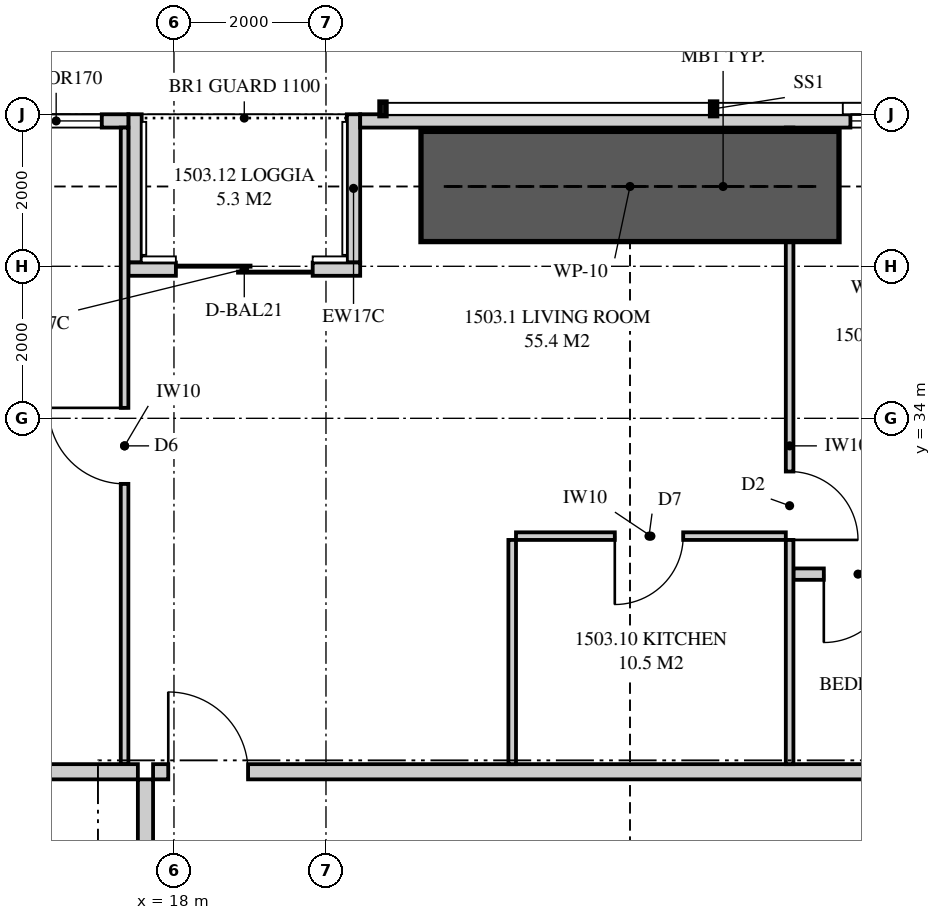
"""IFC4 building model, lengths in metres.
Left out: names, types, materials, properties, quantities, classifications, styles, units other than length and angle.
Written with IfcOpenShell. Run it as: python <this file> out.ifc"""

import sys

from ifc_helpers import new_model, si_unit, direction, frame, frame_2d, origin, place, context, subcontext, project, spatial, polyline, rectangle, outline, extrude, element, fill, save


model = new_model("IFC4")
c1 = context("Model", 3, precision=1e-05, world=origin(), true_north=direction((0.0, 1.0)))
c2 = subcontext(c1, "Body", "Model", "MODEL_VIEW")
j1 = project(units=[si_unit("LENGTHUNIT", "METRE"), si_unit("PLANEANGLEUNIT", "RADIAN")], contexts=[c1])
p1 = place(None, origin())
s1 = spatial("IfcSite", under=j1, at=p1, CompositionType="ELEMENT")
p2 = place(p1, origin())
s2 = spatial("IfcBuilding", under=s1, at=p2, CompositionType="ELEMENT")
p3 = place(p2, frame((0.0, 0.0, 57.85)))
s3 = spatial("IfcBuildingStorey", under=s2, at=p3, CompositionType="ELEMENT", Elevation=57.85)
p4 = place(p3, frame((37.824, 37.913, 0.0), z_axis=(0.0, 0.0, 1.0), x_axis=(-1.0, 0.0, 0.0)))
e1 = element("IfcWall", 1, at=p4, inside=s3, PredefinedType="SOLIDWALL", context=c2, shape_type="SweptSolid", body=[
    extrude(outline(polyline([(0.0, 0.0), (17.374, 0.0), (17.374, 2.15), (2.824, 2.15), (2.824, 3.11), (2.668, 3.11), (2.668, 2.15), (2.62, 2.15), (2.62, 3.11), (0.0, 3.11), (0.0, 0.0)])), frame((0.0, 0.087, 0.0), z_axis=(0.0, -1.0, 0.0), x_axis=(1.0, 0.0, 0.0)), (0.0, 0.0, 1.0), 0.175),
])
p5 = place(p4, frame((5.699, 0.0, 0.4)))
e2 = element("IfcOpeningElement", 2, at=p5, cuts=e1, PredefinedType="OPENING", context=c2, shape_type="SweptSolid", body=[
    extrude(rectangle(XDim=1.8, YDim=1.7, at=frame_2d((0.9, 0.85))), frame((0.0, 0.097, 0.0), z_axis=(0.0, -1.0, 0.0), x_axis=(1.0, 0.0, 0.0)), (0.0, 0.0, 1.0), 0.195),
])
p6 = place(p4, frame((9.124, 0.0, 0.4)))
e3 = element("IfcOpeningElement", 3, at=p6, cuts=e1, PredefinedType="OPENING", context=c2, shape_type="SweptSolid", body=[
    extrude(rectangle(XDim=1.8, YDim=1.7, at=frame_2d((0.9, 0.85))), frame((0.0, 0.097, 0.0), z_axis=(0.0, -1.0, 0.0), x_axis=(1.0, 0.0, 0.0)), (0.0, 0.0, 1.0), 0.195),
])
p7 = place(p3, frame((17.4, 37.913, 0.0), z_axis=(0.0, 0.0, 1.0), x_axis=(-1.0, 0.0, 0.0)))
e4 = element("IfcWall", 4, at=p7, inside=s3, PredefinedType="SOLIDWALL", context=c2, shape_type="SweptSolid", body=[
    extrude(outline(polyline([(0.0, 0.0), (12.349, 0.0), (12.349, 3.11), (4.604, 3.11), (4.604, 2.15), (4.556, 2.15), (4.556, 3.11), (4.4, 3.11), (4.4, 2.15), (0.0, 2.15), (0.0, 0.0)])), frame((0.0, 0.087, 0.0), z_axis=(0.0, -1.0, 0.0), x_axis=(1.0, 0.0, 0.0)), (0.0, 0.0, 1.0), 0.175),
])
p8 = place(p7, frame((0.35, 0.0, 0.4)))
e5 = element("IfcOpeningElement", 5, at=p8, cuts=e4, PredefinedType="OPENING", context=c2, shape_type="SweptSolid", body=[
    extrude(rectangle(XDim=1.2, YDim=1.7, at=frame_2d((0.6, 0.85))), frame((0.0, 0.097, 0.0), z_axis=(0.0, -1.0, 0.0), x_axis=(1.0, 0.0, 0.0)), (0.0, 0.0, 1.0), 0.195),
])
p9 = place(p7, frame((8.3, 0.0, 0.4)))
e6 = element("IfcOpeningElement", 6, at=p9, cuts=e4, PredefinedType="OPENING", context=c2, shape_type="SweptSolid", body=[
    extrude(rectangle(XDim=1.8, YDim=1.7, at=frame_2d((0.9, 0.85))), frame((0.0, 0.097, 0.0), z_axis=(0.0, -1.0, 0.0), x_axis=(1.0, 0.0, 0.0)), (0.0, 0.0, 1.0), 0.195),
])
p10 = place(p3, frame((20.45, 35.962, 0.0), z_axis=(0.0, 0.0, 1.0), x_axis=(-1.0, 0.0, 0.0)))
e7 = element("IfcWall", 7, at=p10, inside=s3, PredefinedType="SOLIDWALL", context=c2, shape_type="SweptSolid", body=[
    extrude(rectangle(XDim=3.05, YDim=0.175, at=frame_2d((1.525, 0.0))), origin(), (0.0, 0.0, 1.0), 3.11),
])
p11 = place(p10, frame((0.625, 0.0, 0.0)))
e8 = element("IfcOpeningElement", 8, at=p11, cuts=e7, PredefinedType="OPENING", context=c2, shape_type="SweptSolid", body=[
    extrude(rectangle(XDim=1.8, YDim=2.1, at=frame_2d((0.9, 1.05))), frame((0.0, 0.097, 0.0), z_axis=(0.0, -1.0, 0.0), x_axis=(1.0, 0.0, 0.0)), (0.0, 0.0, 1.0), 0.195),
])
for number, where, z_axis, x_axis in (
    (9, (20.363, 38.0, 0.0), (0.0, 0.0, 1.0), (0.0, -1.0, 0.0)),
    (10, (17.488, 38.0, 0.0), (0.0, 0.0, 1.0), (0.0, -1.0, 0.0)),
):
    element("IfcWall", number, at=place(p3, frame(where, z_axis=z_axis, x_axis=x_axis)), inside=s3, PredefinedType="SOLIDWALL", context=c2, shape_type="SweptSolid", body=[
        extrude(outline(polyline([(0.0, 0.0), (1.95, 0.0), (1.95, 3.11), (1.75, 3.11), (1.75, 2.15), (0.15, 2.15), (0.15, 3.11), (0.0, 3.11), (0.0, 0.0)])), frame((0.0, 0.087, 0.0), z_axis=(0.0, -1.0, 0.0), x_axis=(1.0, 0.0, 0.0)), (0.0, 0.0, 1.0), 0.175),
    ])
p12 = place(p3, frame((17.725, 29.35, 0.0), z_axis=(0.0, 0.0, 1.0), x_axis=(1.0, 0.0, 0.0)))
e11 = element("IfcWall", 11, at=p12, inside=s3, PredefinedType="PARTITIONING", context=c2, shape_type="SweptSolid", body=[
    extrude(outline(polyline([(0.0, 0.0), (15.275, 0.0), (15.275, 3.11), (6.612, 3.11), (6.612, 2.541), (5.938, 2.541), (5.938, 3.11), (0.0, 3.11), (0.0, 0.0)])), frame((0.0, 0.1, 0.0), z_axis=(0.0, -1.0, 0.0), x_axis=(1.0, 0.0, 0.0)), (0.0, 0.0, 1.0), 0.2),
])
p13 = place(p12, frame((0.2, 0.0, 0.0)))
e12 = element("IfcOpeningElement", 12, at=p13, cuts=e11, PredefinedType="OPENING", context=c2, shape_type="SweptSolid", body=[
    extrude(rectangle(XDim=1.05, YDim=2.2, at=frame_2d((0.525, 1.1))), frame((0.0, 0.11, 0.0), z_axis=(0.0, -1.0, 0.0), x_axis=(1.0, 0.0, 0.0)), (0.0, 0.0, 1.0), 0.22),
])
p14 = place(p3, frame((26.1, 37.825, 0.0), z_axis=(0.0, 0.0, 1.0), x_axis=(0.0, -1.0, 0.0)))
e13 = element("IfcWall", 13, at=p14, inside=s3, PredefinedType="PARTITIONING", context=c2, shape_type="SweptSolid", body=[
    extrude(outline(polyline([(0.529, 2.15), (0.0, 2.15), (0.0, 0.0), (0.529, 0.0), (0.529, 0.034), (1.021, 0.034), (1.021, 0.0), (8.375, 0.0), (8.375, 3.11), (1.635, 3.11), (1.635, 2.15), (1.021, 2.15), (1.021, 2.116), (0.529, 2.116), (0.529, 2.15)])), frame((0.0, 0.05, 0.0), z_axis=(0.0, -1.0, 0.0), x_axis=(1.0, 0.0, 0.0)), (0.0, 0.0, 1.0), 0.1),
])
p15 = place(p14, frame((4.525, 0.0, 0.0)))
e14 = element("IfcOpeningElement", 14, at=p15, cuts=e13, PredefinedType="OPENING", context=c2, shape_type="SweptSolid", body=[
    extrude(rectangle(XDim=0.9, YDim=2.1, at=frame_2d((0.45, 1.05))), frame((0.0, 0.06, 0.0), z_axis=(0.0, -1.0, 0.0), x_axis=(1.0, 0.0, 0.0)), (0.0, 0.0, 1.0), 0.12),
])
p16 = place(p3, frame((26.15, 31.95, 0.0), z_axis=(0.0, 0.0, 1.0), x_axis=(1.0, 0.0, 0.0)))
e15 = element("IfcWall", 15, at=p16, inside=s3, PredefinedType="PLUMBINGWALL", context=c2, shape_type="SweptSolid", body=[
    extrude(rectangle(XDim=3.3, YDim=0.15, at=frame_2d((1.65, 0.0))), origin(), (0.0, 0.0, 1.0), 3.11),
])
p17 = place(p16, frame((0.4, 0.0, 0.0)))
e16 = element("IfcOpeningElement", 16, at=p17, cuts=e15, PredefinedType="OPENING", context=c2, shape_type="SweptSolid", body=[
    extrude(rectangle(XDim=0.9, YDim=2.1, at=frame_2d((0.45, 1.05))), frame((0.0, 0.085, 0.0), z_axis=(0.0, -1.0, 0.0), x_axis=(1.0, 0.0, 0.0)), (0.0, 0.0, 1.0), 0.17),
])
p18 = place(p3, frame((22.5, 32.45, 0.0), z_axis=(0.0, 0.0, 1.0), x_axis=(1.0, 0.0, 0.0)))
e17 = element("IfcWall", 17, at=p18, inside=s3, PredefinedType="PARTITIONING", context=c2, shape_type="SweptSolid", body=[
    extrude(outline(polyline([(0.0, 0.0), (3.55, 0.0), (3.55, 3.11), (1.787, 3.11), (1.787, 2.541), (1.213, 2.541), (1.213, 3.11), (0.0, 3.11), (0.0, 0.0)])), frame((0.0, 0.05, 0.0), z_axis=(0.0, -1.0, 0.0), x_axis=(1.0, 0.0, 0.0)), (0.0, 0.0, 1.0), 0.1),
])
p19 = place(p18, frame((1.3, 0.0, 0.0)))
e18 = element("IfcOpeningElement", 18, at=p19, cuts=e17, PredefinedType="OPENING", context=c2, shape_type="SweptSolid", body=[
    extrude(rectangle(XDim=0.9, YDim=2.1, at=frame_2d((0.45, 1.05))), frame((0.0, 0.06, 0.0), z_axis=(0.0, -1.0, 0.0), x_axis=(1.0, 0.0, 0.0)), (0.0, 0.0, 1.0), 0.12),
])
p20 = place(p3, frame((22.45, 32.4, 0.0), z_axis=(0.0, 0.0, 1.0), x_axis=(0.0, -1.0, 0.0)))
e19 = element("IfcWall", 19, at=p20, inside=s3, PredefinedType="PARTITIONING", context=c2, shape_type="SweptSolid", body=[
    extrude(rectangle(XDim=2.95, YDim=0.1, at=frame_2d((1.475, 0.0))), origin(), (0.0, 0.0, 1.0), 3.11),
])
p21 = place(p3, frame((17.35, 37.825, 0.0), z_axis=(0.0, 0.0, 1.0), x_axis=(0.0, -1.0, 0.0)))
e20 = element("IfcWall", 20, at=p21, inside=s3, PredefinedType="PARTITIONING", context=c2, shape_type="SweptSolid", body=[
    extrude(outline(polyline([(0.0, 0.0), (8.375, 0.0), (8.375, 3.11), (1.635, 3.11), (1.635, 2.15), (0.0, 2.15), (0.0, 3.11), (0.0, 0.0)])), frame((0.0, 0.05, 0.0), z_axis=(0.0, -1.0, 0.0), x_axis=(1.0, 0.0, 0.0)), (0.0, 0.0, 1.0), 0.1),
])
p22 = place(p21, frame((3.688, 0.0, 0.0)))
e21 = element("IfcOpeningElement", 21, at=p22, cuts=e20, PredefinedType="OPENING", context=c2, shape_type="SweptSolid", body=[
    extrude(rectangle(XDim=1.0, YDim=2.1, at=frame_2d((0.5, 1.05))), frame((0.0, 0.06, 0.0), z_axis=(0.0, -1.0, 0.0), x_axis=(1.0, 0.0, 0.0)), (0.0, 0.0, 1.0), 0.12),
])
p23 = place(p3, frame((2.0, 29.35, 0.0), z_axis=(0.0, 0.0, 1.0), x_axis=(1.0, 0.0, 0.0)))
e22 = element("IfcWall", 22, at=p23, inside=s3, PredefinedType="PARTITIONING", context=c2, shape_type="SweptSolid", body=[
    extrude(outline(polyline([(0.0, 0.0), (15.525, 0.0), (15.525, 3.11), (11.337, 3.11), (11.337, 2.541), (10.663, 2.541), (10.663, 3.11), (9.51, 3.11), (9.51, 2.51), (6.89, 2.51), (6.89, 3.11), (2.969, 3.11), (2.969, 2.541), (2.577, 2.541), (2.577, 2.15), (0.733, 2.15), (0.733, 3.11), (0.0, 3.11), (0.0, 0.0)])), frame((0.0, 0.1, 0.0), z_axis=(0.0, -1.0, 0.0), x_axis=(1.0, 0.0, 0.0)), (0.0, 0.0, 1.0), 0.2),
])
p24 = place(p3, frame((17.625, 24.2, 0.0), z_axis=(0.0, 0.0, 1.0), x_axis=(0.0, 1.0, 0.0)))
e23 = element("IfcWall", 23, at=p24, inside=s3, PredefinedType="PARTITIONING", context=c2, shape_type="SweptSolid", body=[
    extrude(outline(polyline([(0.0, 0.0), (5.05, 0.0), (5.05, 3.11), (1.137, 3.11), (1.137, 2.541), (0.463, 2.541), (0.463, 3.11), (0.0, 3.11), (0.0, 0.0)])), frame((0.0, 0.1, 0.0), z_axis=(0.0, -1.0, 0.0), x_axis=(1.0, 0.0, 0.0)), (0.0, 0.0, 1.0), 0.2),
])
p25 = place(p24, frame((1.075, 0.0, 0.0)))
e24 = element("IfcOpeningElement", 24, at=p25, cuts=e23, PredefinedType="OPENING", context=c2, shape_type="SweptSolid", body=[
    extrude(rectangle(XDim=1.8, YDim=2.1, at=frame_2d((0.9, 1.05))), frame((0.0, 0.11, 0.0), z_axis=(0.0, -1.0, 0.0), x_axis=(1.0, 0.0, 0.0)), (0.0, 0.0, 1.0), 0.22),
])
p26 = place(p3, frame((21.25, 37.05, 0.0), z_axis=(0.0, 0.0, 1.0), x_axis=(1.0, 0.0, 0.0)))
e25 = element("IfcWall", 25, at=p26, inside=s3, PredefinedType="SHEAR", context=c2, shape_type="SweptSolid", body=[
    extrude(rectangle(XDim=5.5, YDim=1.45, at=frame_2d((2.75, 0.0))), origin(), (0.0, 0.0, 1.0), 3.35),
])
p27 = place(p6, origin())
e26 = element("IfcWindow", 26, at=p27, inside=s3, PartitioningType="SINGLE_PANEL", PredefinedType="WINDOW", context=c2, shape_type="SweptSolid", body=[
    extrude(rectangle(XDim=1.8, YDim=1.7, at=frame_2d((0.9, 0.85))), frame((0.0, 0.03, 0.0), z_axis=(0.0, -1.0, 0.0), x_axis=(1.0, 0.0, 0.0)), (0.0, 0.0, 1.0), 0.06),
])
fill(e3, e26)
p28 = place(p11, origin())
e27 = element("IfcDoor", 27, at=p28, inside=s3, OperationType="SLIDING_TO_LEFT", PredefinedType="DOOR", context=c2, shape_type="SweptSolid", body=[
    extrude(rectangle(XDim=1.8, YDim=2.1, at=frame_2d((0.9, 1.05))), frame((0.0, 0.025, 0.0), z_axis=(0.0, -1.0, 0.0), x_axis=(1.0, 0.0, 0.0)), (0.0, 0.0, 1.0), 0.05),
])
fill(e8, e27)
p29 = place(p8, origin())
e28 = element("IfcWindow", 28, at=p29, inside=s3, PartitioningType="SINGLE_PANEL", PredefinedType="WINDOW", context=c2, shape_type="SweptSolid", body=[
    extrude(rectangle(XDim=1.2, YDim=1.7, at=frame_2d((0.6, 0.85))), frame((0.0, 0.03, 0.0), z_axis=(0.0, -1.0, 0.0), x_axis=(1.0, 0.0, 0.0)), (0.0, 0.0, 1.0), 0.06),
])
fill(e5, e28)
p30 = place(p13, origin())
e29 = element("IfcDoor", 29, at=p30, inside=s3, OperationType="SINGLE_SWING_LEFT", PredefinedType="DOOR", context=c2, shape_type="SweptSolid", body=[
    extrude(rectangle(XDim=1.05, YDim=2.2, at=frame_2d((0.525, 1.1))), frame((0.0, 0.025, 0.0), z_axis=(0.0, -1.0, 0.0), x_axis=(1.0, 0.0, 0.0)), (0.0, 0.0, 1.0), 0.05),
])
fill(e12, e29)
p31 = place(p15, origin())
e30 = element("IfcDoor", 30, at=p31, inside=s3, OperationType="SINGLE_SWING_RIGHT", PredefinedType="DOOR", context=c2, shape_type="SweptSolid", body=[
    extrude(rectangle(XDim=0.9, YDim=2.1, at=frame_2d((0.45, 1.05))), frame((0.0, 0.025, 0.0), z_axis=(0.0, -1.0, 0.0), x_axis=(1.0, 0.0, 0.0)), (0.0, 0.0, 1.0), 0.05),
])
fill(e14, e30)
p32 = place(p17, frame((0.9, 0.0, 0.0), z_axis=(0.0, 0.0, 1.0), x_axis=(-1.0, 0.0, 0.0)))
e31 = element("IfcDoor", 31, at=p32, inside=s3, OperationType="SINGLE_SWING_RIGHT", PredefinedType="DOOR", context=c2, shape_type="SweptSolid", body=[
    extrude(rectangle(XDim=0.9, YDim=2.1, at=frame_2d((0.45, 1.05))), frame((0.0, 0.025, 0.0), z_axis=(0.0, -1.0, 0.0), x_axis=(1.0, 0.0, 0.0)), (0.0, 0.0, 1.0), 0.05),
])
fill(e16, e31)
p33 = place(p19, frame((0.9, 0.0, 0.0), z_axis=(0.0, 0.0, 1.0), x_axis=(-1.0, 0.0, 0.0)))
e32 = element("IfcDoor", 32, at=p33, inside=s3, OperationType="SINGLE_SWING_RIGHT", PredefinedType="DOOR", context=c2, shape_type="SweptSolid", body=[
    extrude(rectangle(XDim=0.9, YDim=2.1, at=frame_2d((0.45, 1.05))), frame((0.0, 0.025, 0.0), z_axis=(0.0, -1.0, 0.0), x_axis=(1.0, 0.0, 0.0)), (0.0, 0.0, 1.0), 0.05),
])
fill(e18, e32)
p34 = place(p22, frame((1.0, 0.0, 0.0), z_axis=(0.0, 0.0, 1.0), x_axis=(-1.0, 0.0, 0.0)))
e33 = element("IfcDoor", 33, at=p34, inside=s3, OperationType="SINGLE_SWING_RIGHT", PredefinedType="DOOR", context=c2, shape_type="SweptSolid", body=[
    extrude(rectangle(XDim=1.0, YDim=2.1, at=frame_2d((0.5, 1.05))), frame((0.0, 0.025, 0.0), z_axis=(0.0, -1.0, 0.0), x_axis=(1.0, 0.0, 0.0)), (0.0, 0.0, 1.0), 0.05),
])
fill(e21, e33)
save(model, sys.argv[1])
